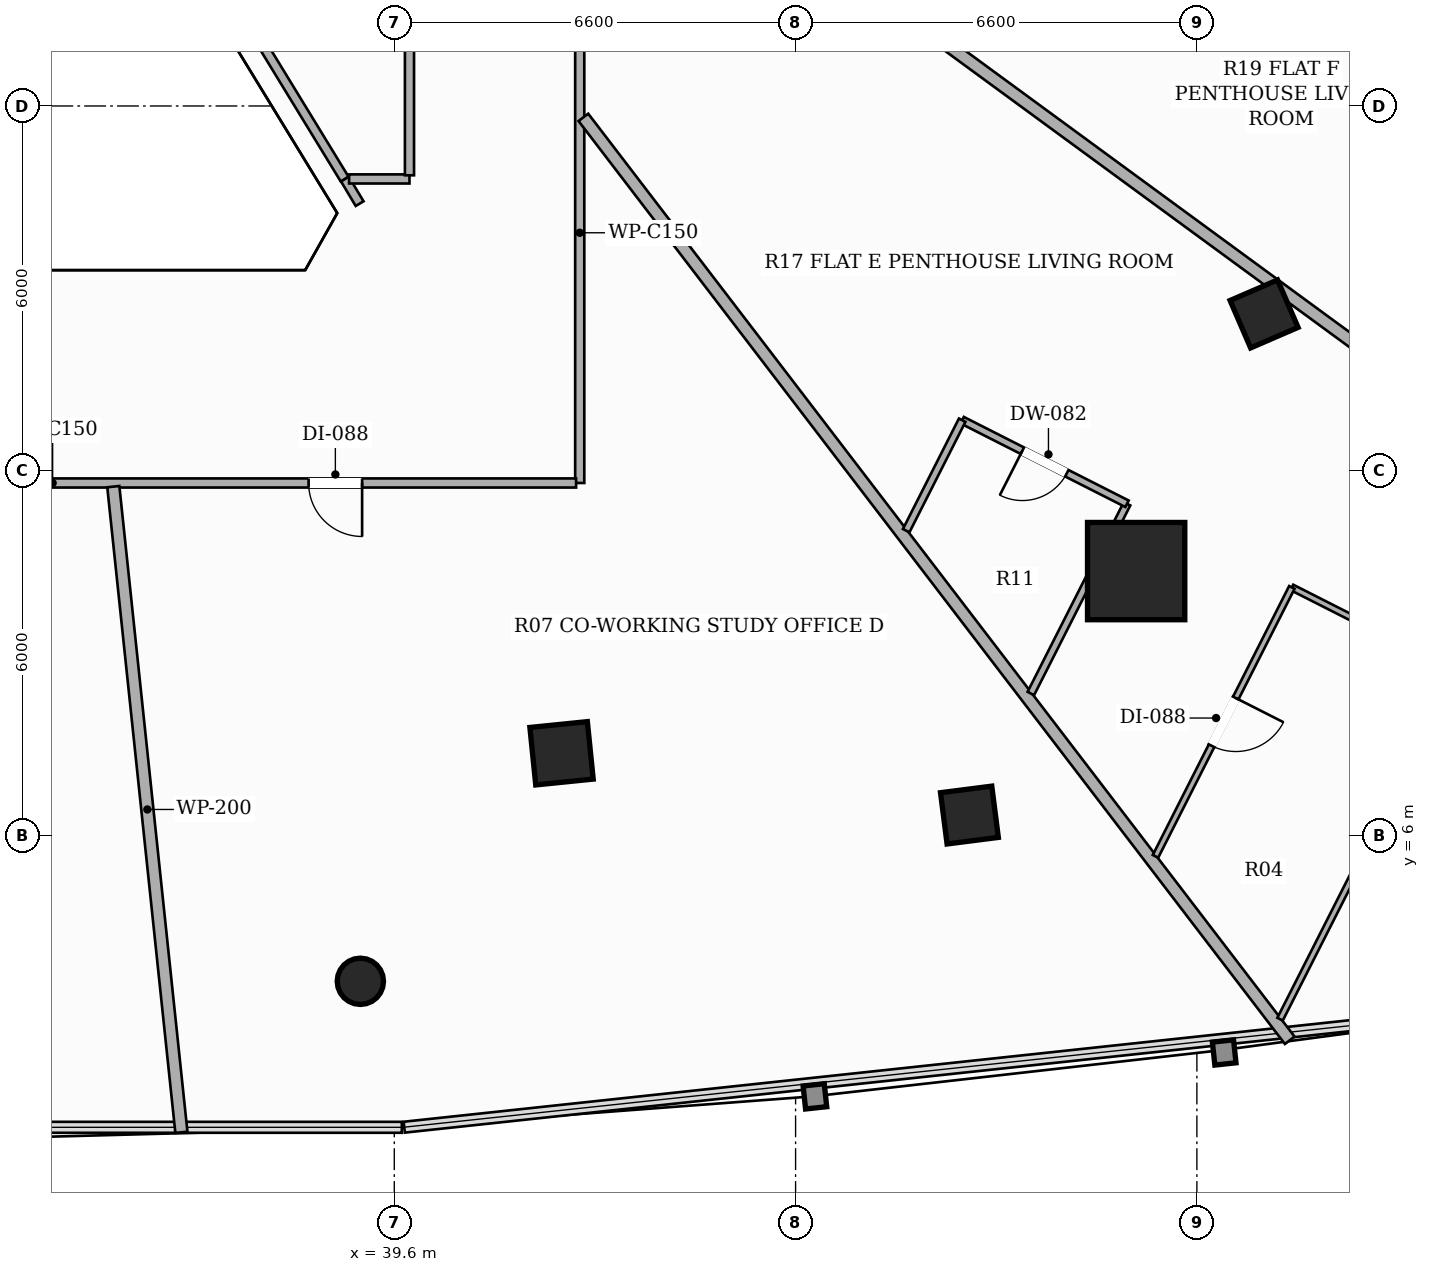
"""IFC4 building model, lengths in metres.
Left out: names, types, materials, properties, quantities, classifications, styles, units other than length and angle.
Written with IfcOpenShell. Run it as: python <this file> out.ifc"""

import sys

from ifc_helpers import new_model, si_unit, direction, frame, frame_2d, origin, origin_2d, place, context, subcontext, project, spatial, rectangle, hollow_rectangle, hollow_circle, extrude, element, fill, save


model = new_model("IFC4")
c1 = context("Model", 3, precision=1e-05, world=origin(), true_north=direction((0.0, 1.0)))
c2 = subcontext(c1, "Body", "Model", "MODEL_VIEW")
j1 = project(units=[si_unit("LENGTHUNIT", "METRE"), si_unit("PLANEANGLEUNIT", "RADIAN")], contexts=[c1])
p1 = place(None, origin())
s1 = spatial("IfcSite", under=j1, at=p1, CompositionType="ELEMENT")
p2 = place(p1, origin())
s2 = spatial("IfcBuilding", under=s1, at=p2, CompositionType="ELEMENT")
p3 = place(p2, frame((0.0, 0.0, 30.2)))
s3 = spatial("IfcBuildingStorey", under=s2, at=p3, CompositionType="ELEMENT", Elevation=30.2)
p4 = place(p3, frame((51.801, 10.351, 0.0), z_axis=(0.0, 0.0, 1.0), x_axis=(1.0, 0.0, 0.0)))
e1 = element("IfcColumn", 1, at=p4, inside=s3, PredefinedType="COLUMN", context=c2, shape_type="SweptSolid", body=[
    extrude(hollow_rectangle(XDim=1.6, YDim=1.6, WallThickness=0.05, at=origin_2d()), origin(), (0.0, 0.0, 1.0), 3.3),
])
p5 = place(p3, frame((42.351, 7.355, 0.0), z_axis=(0.0, 0.0, 1.0), x_axis=(0.994880708829, 0.101056297183, 0.0)))
e2 = element("IfcColumn", 2, at=p5, inside=s3, PredefinedType="COLUMN", context=c2, shape_type="SweptSolid", body=[
    extrude(hollow_rectangle(XDim=0.95, YDim=0.95, WallThickness=0.032, at=origin_2d()), origin(), (0.0, 0.0, 1.0), 3.3),
])
for number, where, z_axis, x_axis in (
    (3, (49.059, 6.339, 0.0), (0.0, 0.0, 1.0), (0.992, 0.127, 0.0)),
    (4, (53.905, 14.58, 0.0), (0.0, 0.0, 1.0), (-0.397, 0.918, 0.0)),
):
    element("IfcColumn", number, at=place(p3, frame(where, z_axis=z_axis, x_axis=x_axis)), inside=s3, PredefinedType="COLUMN", context=c2, shape_type="SweptSolid", body=[
        extrude(hollow_rectangle(XDim=0.85, YDim=0.85, WallThickness=0.028, at=origin_2d()), origin(), (0.0, 0.0, 1.0), 3.3),
    ])
p6 = place(p3, frame((39.042, 3.605, 0.0), z_axis=(0.0, 0.0, 1.0), x_axis=(1.0, 0.0, 0.0)))
e5 = element("IfcColumn", 5, at=p6, inside=s3, PredefinedType="COLUMN", context=c2, shape_type="SweptSolid", body=[
    extrude(hollow_circle(Radius=0.381, WallThickness=0.022, at=origin_2d()), origin(), (0.0, 0.0, 1.0), 3.3),
])
p7 = place(p3, frame((42.65, 36.84, 0.0), z_axis=(0.0, 0.0, 1.0), x_axis=(0.0, -1.0, 0.0)))
e6 = element("IfcWall", 6, at=p7, inside=s3, PredefinedType="PARTITIONING", context=c2, shape_type="SweptSolid", body=[
    extrude(rectangle(XDim=25.04, YDim=0.15, at=frame_2d((12.52, 0.0))), origin(), (0.0, 0.0, 1.0), 2.413),
])
p8 = place(p7, frame((2.543, 0.0, 0.0)))
e7 = element("IfcOpeningElement", 7, at=p8, cuts=e6, PredefinedType="OPENING", context=c2, shape_type="SweptSolid", body=[
    extrude(rectangle(XDim=0.88, YDim=2.1, at=frame_2d((0.44, 1.05))), frame((0.0, 0.085, 0.0), z_axis=(0.0, -1.0, 0.0), x_axis=(1.0, 0.0, 0.0)), (0.0, 0.0, 1.0), 0.17),
])
p9 = place(p7, frame((15.79, 0.0, 0.0)))
e8 = element("IfcOpeningElement", 8, at=p9, cuts=e6, PredefinedType="OPENING", context=c2, shape_type="SweptSolid", body=[
    extrude(rectangle(XDim=0.92, YDim=2.15, at=frame_2d((0.46, 1.075))), frame((0.0, 0.085, 0.0), z_axis=(0.0, -1.0, 0.0), x_axis=(1.0, 0.0, 0.0)), (0.0, 0.0, 1.0), 0.17),
])
p10 = place(p7, frame((9.103, 0.0, 0.0)))
e9 = element("IfcOpeningElement", 9, at=p10, cuts=e6, PredefinedType="OPENING", context=c2, shape_type="SweptSolid", body=[
    extrude(rectangle(XDim=0.92, YDim=2.15, at=frame_2d((0.46, 1.075))), frame((0.0, 0.085, 0.0), z_axis=(0.0, -1.0, 0.0), x_axis=(1.0, 0.0, 0.0)), (0.0, 0.0, 1.0), 0.17),
])
p11 = place(p3, frame((42.59, 11.8, 0.0), z_axis=(0.0, 0.0, 1.0), x_axis=(-1.0, 0.0, 0.0)))
e10 = element("IfcWall", 10, at=p11, inside=s3, PredefinedType="PARTITIONING", context=c2, shape_type="SweptSolid", body=[
    extrude(rectangle(XDim=19.24, YDim=0.15, at=frame_2d((9.62, 0.0))), origin(), (0.0, 0.0, 1.0), 2.669),
])
p12 = place(p11, frame((12.818, 0.0, 0.0)))
e11 = element("IfcOpeningElement", 11, at=p12, cuts=e10, PredefinedType="OPENING", context=c2, shape_type="SweptSolid", body=[
    extrude(rectangle(XDim=0.92, YDim=2.15, at=frame_2d((0.46, 1.075))), frame((0.0, 0.085, 0.0), z_axis=(0.0, -1.0, 0.0), x_axis=(1.0, 0.0, 0.0)), (0.0, 0.0, 1.0), 0.17),
])
p13 = place(p11, frame((3.519, 0.0, 0.0)))
e12 = element("IfcOpeningElement", 12, at=p13, cuts=e10, PredefinedType="OPENING", context=c2, shape_type="SweptSolid", body=[
    extrude(rectangle(XDim=0.88, YDim=2.1, at=frame_2d((0.44, 1.05))), frame((0.0, 0.085, 0.0), z_axis=(0.0, -1.0, 0.0), x_axis=(1.0, 0.0, 0.0)), (0.0, 0.0, 1.0), 0.17),
])
p14 = place(p3, frame((39.03, 16.394, 0.0), z_axis=(0.0, 0.0, 1.0), x_axis=(-0.51343298076, 0.858129695482, 0.0)))
e13 = element("IfcWall", 13, at=p14, inside=s3, PredefinedType="PARTITIONING", context=c2, shape_type="SweptSolid", body=[
    extrude(rectangle(XDim=0.473, YDim=0.15, at=frame_2d((0.237, 0.0))), origin(), (0.0, 0.0, 1.0), 3.06),
])
p15 = place(p3, frame((38.857, 16.8, 0.0), z_axis=(0.0, 0.0, 1.0), x_axis=(1.0, 0.0, 0.0)))
e14 = element("IfcWall", 14, at=p15, inside=s3, PredefinedType="PARTITIONING", context=c2, shape_type="SweptSolid", body=[
    extrude(rectangle(XDim=0.993, YDim=0.15, at=frame_2d((0.497, 0.0))), origin(), (0.0, 0.0, 1.0), 3.06),
])
p16 = place(p3, frame((39.85, 16.86, 0.0), z_axis=(0.0, 0.0, 1.0), x_axis=(0.0, 1.0, 0.0)))
e15 = element("IfcWall", 15, at=p16, inside=s3, PredefinedType="PARTITIONING", context=c2, shape_type="SweptSolid", body=[
    extrude(rectangle(XDim=6.99, YDim=0.15, at=frame_2d((3.495, 0.0))), origin(), (0.0, 0.0, 1.0), 2.669),
])
p17 = place(p16, frame((3.055, 0.0, 0.0)))
e16 = element("IfcOpeningElement", 16, at=p17, cuts=e15, PredefinedType="OPENING", context=c2, shape_type="SweptSolid", body=[
    extrude(rectangle(XDim=0.88, YDim=2.1, at=frame_2d((0.44, 1.05))), frame((0.0, 0.085, 0.0), z_axis=(0.0, -1.0, 0.0), x_axis=(1.0, 0.0, 0.0)), (0.0, 0.0, 1.0), 0.17),
])
p18 = place(p3, frame((34.508, 23.79, 0.0), z_axis=(0.0, 0.0, 1.0), x_axis=(0.52163195406, -0.853170618636, 0.0)))
e17 = element("IfcWall", 17, at=p18, inside=s3, PredefinedType="PARTITIONING", context=c2, shape_type="SweptSolid", body=[
    extrude(rectangle(XDim=8.195, YDim=0.15, at=frame_2d((4.098, 0.0))), origin(), (0.0, 0.0, 1.0), 2.669),
])
p19 = place(p3, frame((34.979, 11.74, 0.0), z_axis=(0.0, 0.0, 1.0), x_axis=(0.104910939681, -0.994481621115, 0.0)))
e18 = element("IfcWall", 18, at=p19, inside=s3, PredefinedType="PARTITIONING", context=c2, shape_type="SweptSolid", body=[
    extrude(rectangle(XDim=10.677, YDim=0.2, at=frame_2d((5.338, 0.0))), origin(), (0.0, 0.0, 1.0), 2.413),
])
p20 = place(p3, frame((42.71, 17.813, 0.0), z_axis=(0.0, 0.0, 1.0), x_axis=(0.607788570878, -0.794098893784, 0.0)))
e19 = element("IfcWall", 19, at=p20, inside=s3, PredefinedType="PARTITIONING", context=c2, shape_type="SweptSolid", body=[
    extrude(rectangle(XDim=19.114, YDim=0.2, at=frame_2d((9.557, 0.0))), origin(), (0.0, 0.0, 1.0), 2.413),
])
p21 = place(p3, frame((42.71, 23.387, 0.0), z_axis=(0.0, 0.0, 1.0), x_axis=(0.806713303584, -0.590943014021, 0.0)))
e20 = element("IfcWall", 20, at=p21, inside=s3, PredefinedType="PARTITIONING", context=c2, shape_type="SweptSolid", body=[
    extrude(rectangle(XDim=22.171, YDim=0.2, at=frame_2d((11.086, 0.0))), origin(), (0.0, 0.0, 1.0), 2.413),
])
p22 = place(p3, frame((50.069, 8.338, 0.0), z_axis=(0.0, 0.0, 1.0), x_axis=(0.45217581214, 0.891928828391, 0.0)))
e21 = element("IfcWall", 21, at=p22, inside=s3, PredefinedType="PARTITIONING", context=c2, shape_type="SweptSolid", body=[
    extrude(rectangle(XDim=3.498, YDim=0.12, at=frame_2d((1.749, 0.0))), origin(), (0.0, 0.0, 1.0), 2.413),
])
p23 = place(p3, frame((51.651, 11.458, 0.0), z_axis=(0.0, 0.0, 1.0), x_axis=(-0.891842269509, 0.452346511336, 0.0)))
e22 = element("IfcWall", 22, at=p23, inside=s3, PredefinedType="PARTITIONING", context=c2, shape_type="SweptSolid", body=[
    extrude(rectangle(XDim=3.04, YDim=0.12, at=frame_2d((1.52, 0.0))), origin(), (0.0, 0.0, 1.0), 2.413),
])
p24 = place(p23, frame((1.11, 0.0, 0.0)))
e23 = element("IfcOpeningElement", 23, at=p24, cuts=e22, PredefinedType="OPENING", context=c2, shape_type="SweptSolid", body=[
    extrude(rectangle(XDim=0.82, YDim=2.1, at=frame_2d((0.41, 1.05))), frame((0.0, 0.07, 0.0), z_axis=(0.0, -1.0, 0.0), x_axis=(1.0, 0.0, 0.0)), (0.0, 0.0, 1.0), 0.14),
])
p25 = place(p3, frame((48.94, 12.833, 0.0), z_axis=(0.0, 0.0, 1.0), x_axis=(-0.452097038501, -0.891968759418, 0.0)))
e24 = element("IfcWall", 24, at=p25, inside=s3, PredefinedType="PARTITIONING", context=c2, shape_type="SweptSolid", body=[
    extrude(rectangle(XDim=2.037, YDim=0.12, at=frame_2d((1.019, 0.0))), origin(), (0.0, 0.0, 1.0), 3.06),
])
p26 = place(p3, frame((57.073, 8.708, 0.0), z_axis=(0.0, 0.0, 1.0), x_axis=(-0.891842269509, 0.452346511336, 0.0)))
e25 = element("IfcWall", 25, at=p26, inside=s3, PredefinedType="PARTITIONING", context=c2, shape_type="SweptSolid", body=[
    extrude(rectangle(XDim=3.04, YDim=0.1, at=frame_2d((1.52, 0.0))), origin(), (0.0, 0.0, 1.0), 2.619),
])
p27 = place(p3, frame((54.362, 10.083, 0.0), z_axis=(0.0, 0.0, 1.0), x_axis=(-0.452306340277, -0.891862643317, 0.0)))
e26 = element("IfcWall", 26, at=p27, inside=s3, PredefinedType="PARTITIONING", context=c2, shape_type="SweptSolid", body=[
    extrude(rectangle(XDim=4.959, YDim=0.1, at=frame_2d((2.48, 0.0))), origin(), (0.0, 0.0, 1.0), 3.06),
])
p28 = place(p27, frame((2.04, 0.0, 0.0)))
e27 = element("IfcOpeningElement", 27, at=p28, cuts=e26, PredefinedType="OPENING", context=c2, shape_type="SweptSolid", body=[
    extrude(rectangle(XDim=0.88, YDim=2.1, at=frame_2d((0.44, 1.05))), frame((0.0, 0.06, 0.0), z_axis=(0.0, -1.0, 0.0), x_axis=(1.0, 0.0, 0.0)), (0.0, 0.0, 1.0), 0.12),
])
p29 = place(p3, frame((54.168, 2.982, 0.0), z_axis=(0.0, 0.0, 1.0), x_axis=(0.452437935158, 0.891795893033, 0.0)))
e28 = element("IfcWall", 28, at=p29, inside=s3, PredefinedType="PARTITIONING", context=c2, shape_type="SweptSolid", body=[
    extrude(rectangle(XDim=6.421, YDim=0.1, at=frame_2d((3.21, 0.0))), origin(), (0.0, 0.0, 1.0), 2.619),
])
p30 = place(p13, origin())
e29 = element("IfcDoor", 29, at=p30, inside=s3, OperationType="SINGLE_SWING_LEFT", PredefinedType="DOOR", context=c2, shape_type="SweptSolid", body=[
    extrude(rectangle(XDim=0.88, YDim=2.1, at=frame_2d((0.44, 1.05))), frame((0.0, 0.025, 0.0), z_axis=(0.0, -1.0, 0.0), x_axis=(1.0, 0.0, 0.0)), (0.0, 0.0, 1.0), 0.05),
])
fill(e12, e29)
p31 = place(p24, origin())
e30 = element("IfcDoor", 30, at=p31, inside=s3, OperationType="SINGLE_SWING_RIGHT", PredefinedType="DOOR", context=c2, shape_type="SweptSolid", body=[
    extrude(rectangle(XDim=0.82, YDim=2.1, at=frame_2d((0.41, 1.05))), frame((0.0, 0.025, 0.0), z_axis=(0.0, -1.0, 0.0), x_axis=(1.0, 0.0, 0.0)), (0.0, 0.0, 1.0), 0.05),
])
fill(e23, e30)
p32 = place(p28, origin())
e31 = element("IfcDoor", 31, at=p32, inside=s3, OperationType="SINGLE_SWING_LEFT", PredefinedType="DOOR", context=c2, shape_type="SweptSolid", body=[
    extrude(rectangle(XDim=0.88, YDim=2.1, at=frame_2d((0.44, 1.05))), frame((0.0, 0.025, 0.0), z_axis=(0.0, -1.0, 0.0), x_axis=(1.0, 0.0, 0.0)), (0.0, 0.0, 1.0), 0.05),
])
fill(e27, e31)
save(model, sys.argv[1])
